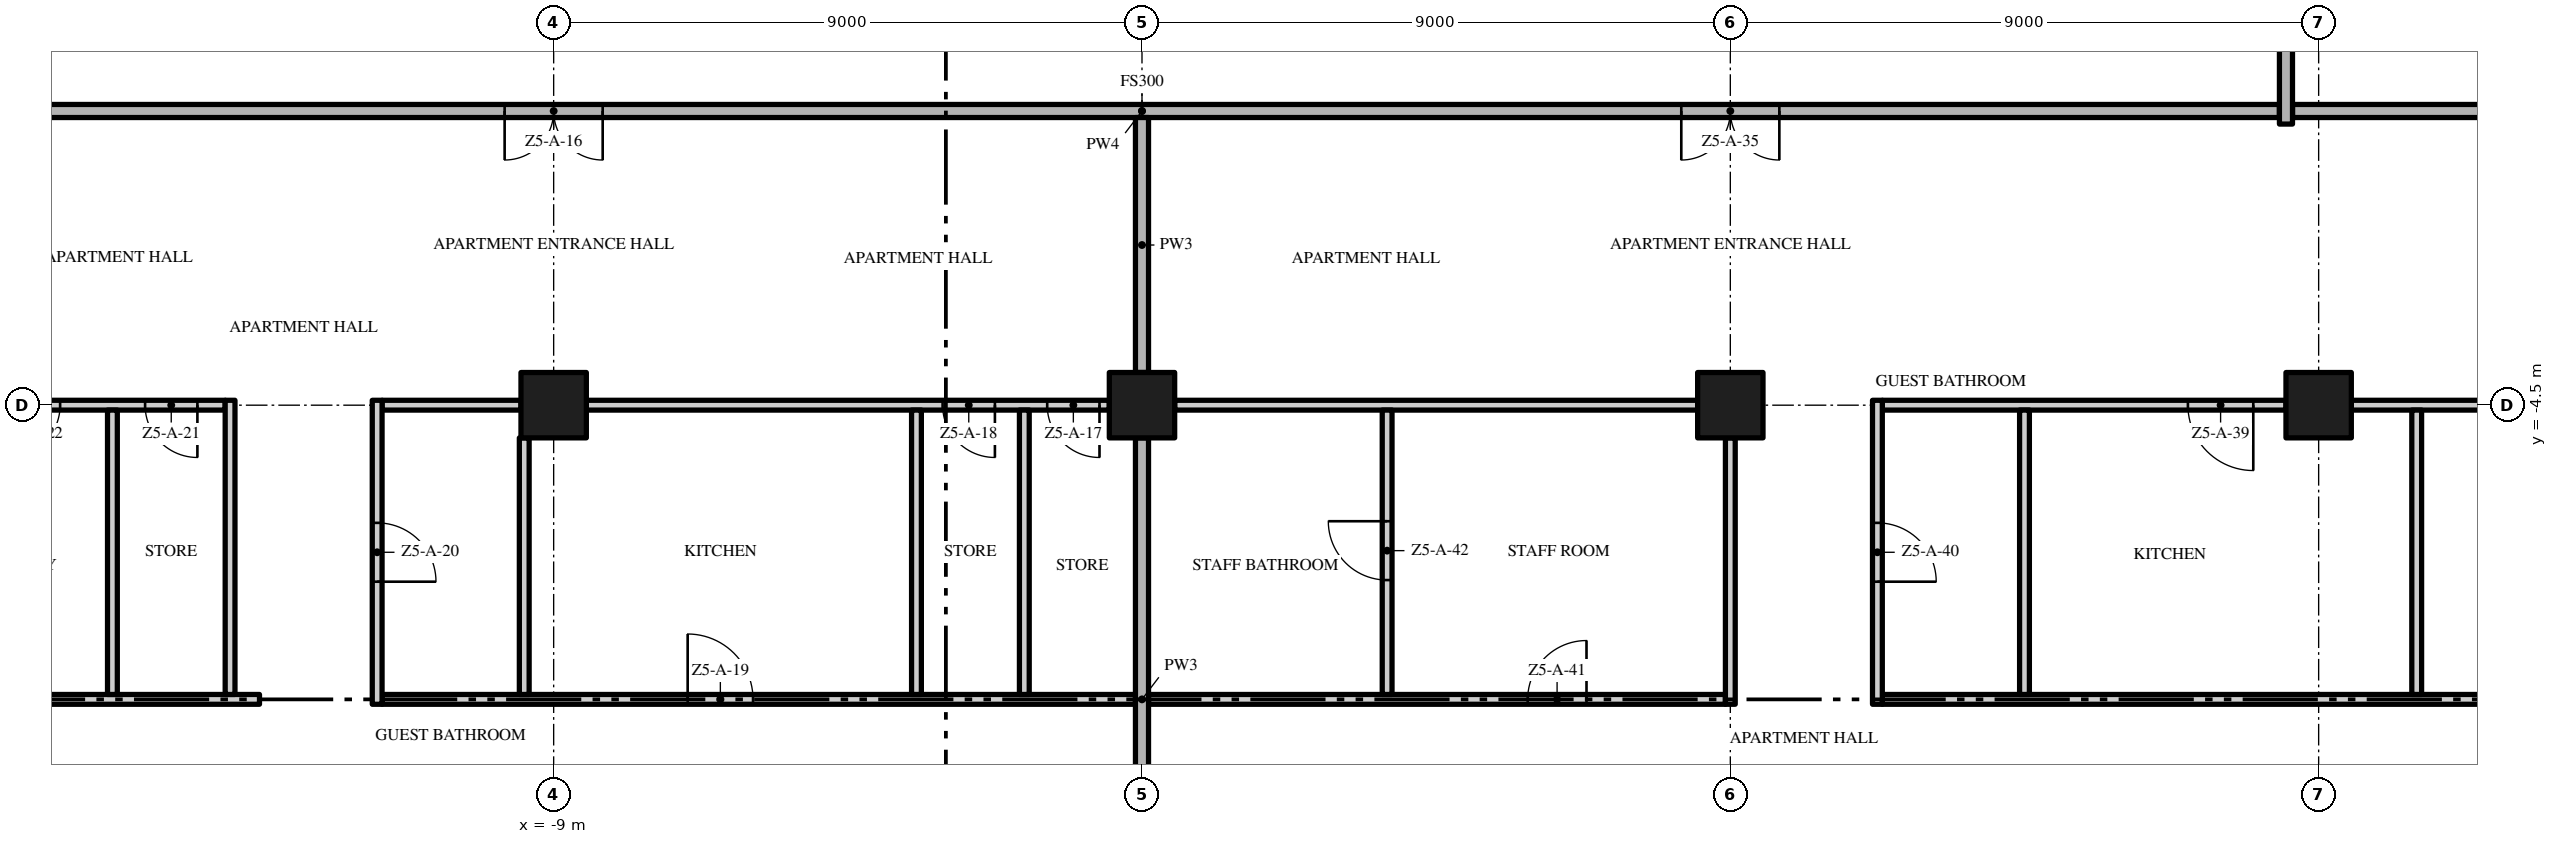
"""IFC4 building model, lengths in metres.
Left out: names, types, materials, properties, quantities, classifications, styles, units other than length and angle.
Written with IfcOpenShell. Run it as: python <this file> out.ifc"""

import sys

from ifc_helpers import new_model, si_unit, direction, frame, frame_2d, origin, origin_2d, place, context, subcontext, project, spatial, rectangle, extrude, element, fill, save


model = new_model("IFC4")
c1 = context("Model", 3, precision=1e-05, world=origin(), true_north=direction((0.0, 1.0)))
c2 = subcontext(c1, "Body", "Model", "MODEL_VIEW")
j1 = project(units=[si_unit("LENGTHUNIT", "METRE"), si_unit("PLANEANGLEUNIT", "RADIAN")], contexts=[c1])
p1 = place(None, origin())
s1 = spatial("IfcSite", under=j1, at=p1, CompositionType="ELEMENT")
p2 = place(p1, origin())
s2 = spatial("IfcBuilding", under=s1, at=p2, CompositionType="ELEMENT")
p3 = place(p2, frame((0.0, 0.0, 242.6)))
s3 = spatial("IfcBuildingStorey", under=s2, at=p3, CompositionType="ELEMENT", Elevation=242.6)
for number, where, z_axis, x_axis in (
    (1, (-9.0, -4.5, 0.0), (0.0, 0.0, 1.0), (1.0, 0.0, 0.0)),
    (2, (0.0, -4.5, 0.0), (0.0, 0.0, 1.0), (1.0, 0.0, 0.0)),
    (3, (18.0, -4.5, 0.0), (0.0, 0.0, 1.0), (1.0, 0.0, 0.0)),
    (4, (9.0, -4.5, 0.0), (0.0, 0.0, 1.0), (1.0, 0.0, 0.0)),
):
    element("IfcColumn", number, at=place(p3, frame(where, z_axis=z_axis, x_axis=x_axis)), inside=s3, PredefinedType="COLUMN", context=c2, shape_type="SweptSolid", body=[
        extrude(rectangle(XDim=1.0, YDim=1.0, at=origin_2d()), origin(), (0.0, 0.0, 1.0), 3.5),
    ])
p4 = place(p3, frame((-26.7, -9.0, 0.0), z_axis=(0.0, 0.0, 1.0), x_axis=(1.0, 0.0, 0.0)))
e5 = element("IfcWall", 5, at=p4, inside=s3, PredefinedType="PARTITIONING", context=c2, shape_type="SweptSolid", body=[
    extrude(rectangle(XDim=13.2, YDim=0.15, at=frame_2d((6.6, 0.0))), origin(), (0.0, 0.0, 1.0), 3.5),
])
p5 = place(p3, frame((-11.625, -9.0, 0.0), z_axis=(0.0, 0.0, 1.0), x_axis=(1.0, 0.0, 0.0)))
e6 = element("IfcWall", 6, at=p5, inside=s3, PredefinedType="PARTITIONING", context=c2, shape_type="SweptSolid", body=[
    extrude(rectangle(XDim=11.525, YDim=0.15, at=frame_2d((5.763, 0.0))), origin(), (0.0, 0.0, 1.0), 3.5),
])
p6 = place(p5, frame((4.675, 0.0, 0.0)))
e7 = element("IfcOpeningElement", 7, at=p6, cuts=e6, PredefinedType="OPENING", context=c2, shape_type="SweptSolid", body=[
    extrude(rectangle(XDim=1.0, YDim=2.4, at=frame_2d((0.5, 1.2))), frame((0.0, 0.085, 0.0), z_axis=(0.0, -1.0, 0.0), x_axis=(1.0, 0.0, 0.0)), (0.0, 0.0, 1.0), 0.17),
])
p7 = place(p3, frame((0.1, -9.0, 0.0), z_axis=(0.0, 0.0, 1.0), x_axis=(1.0, 0.0, 0.0)))
e8 = element("IfcWall", 8, at=p7, inside=s3, PredefinedType="PARTITIONING", context=c2, shape_type="SweptSolid", body=[
    extrude(rectangle(XDim=8.825, YDim=0.15, at=frame_2d((4.412, 0.0))), origin(), (0.0, 0.0, 1.0), 3.5),
])
p8 = place(p7, frame((5.8, 0.0, 0.0)))
e9 = element("IfcOpeningElement", 9, at=p8, cuts=e8, PredefinedType="OPENING", context=c2, shape_type="SweptSolid", body=[
    extrude(rectangle(XDim=0.9, YDim=2.1, at=frame_2d((0.45, 1.05))), frame((0.0, 0.085, 0.0), z_axis=(0.0, -1.0, 0.0), x_axis=(1.0, 0.0, 0.0)), (0.0, 0.0, 1.0), 0.17),
])
p9 = place(p3, frame((11.325, -9.0, 0.0), z_axis=(0.0, 0.0, 1.0), x_axis=(1.0, 0.0, 0.0)))
e10 = element("IfcWall", 10, at=p9, inside=s3, PredefinedType="PARTITIONING", context=c2, shape_type="SweptSolid", body=[
    extrude(rectangle(XDim=15.375, YDim=0.15, at=frame_2d((7.688, 0.0))), origin(), (0.0, 0.0, 1.0), 3.5),
])
p10 = place(p9, frame((14.375, 0.0, 0.0)))
e11 = element("IfcOpeningElement", 11, at=p10, cuts=e10, PredefinedType="OPENING", context=c2, shape_type="SweptSolid", body=[
    extrude(rectangle(XDim=0.8, YDim=2.0, at=frame_2d((0.4, 1.0))), frame((0.0, 0.085, 0.0), z_axis=(0.0, -1.0, 0.0), x_axis=(1.0, 0.0, 0.0)), (0.0, 0.0, 1.0), 0.17),
])
p11 = place(p3, frame((-14.025, -4.5, 0.0), z_axis=(0.0, 0.0, 1.0), x_axis=(-1.0, 0.0, 0.0)))
e12 = element("IfcWall", 12, at=p11, inside=s3, PredefinedType="PARTITIONING", context=c2, shape_type="SweptSolid", body=[
    extrude(rectangle(XDim=3.475, YDim=0.15, at=frame_2d((1.738, 0.0))), origin(), (0.0, 0.0, 1.0), 3.5),
])
p12 = place(p11, frame((0.425, 0.0, 0.0)))
e13 = element("IfcOpeningElement", 13, at=p12, cuts=e12, PredefinedType="OPENING", context=c2, shape_type="SweptSolid", body=[
    extrude(rectangle(XDim=0.8, YDim=2.0, at=frame_2d((0.4, 1.0))), frame((0.0, 0.085, 0.0), z_axis=(0.0, -1.0, 0.0), x_axis=(1.0, 0.0, 0.0)), (0.0, 0.0, 1.0), 0.17),
])
p13 = place(p11, frame((2.525, 0.0, 0.0)))
e14 = element("IfcOpeningElement", 14, at=p13, cuts=e12, PredefinedType="OPENING", context=c2, shape_type="SweptSolid", body=[
    extrude(rectangle(XDim=0.8, YDim=2.0, at=frame_2d((0.4, 1.0))), frame((0.0, 0.085, 0.0), z_axis=(0.0, -1.0, 0.0), x_axis=(1.0, 0.0, 0.0)), (0.0, 0.0, 1.0), 0.17),
])
p14 = place(p3, frame((-11.625, -4.5, 0.0), z_axis=(0.0, 0.0, 1.0), x_axis=(1.0, 0.0, 0.0)))
e15 = element("IfcWall", 15, at=p14, inside=s3, PredefinedType="PARTITIONING", context=c2, shape_type="SweptSolid", body=[
    extrude(rectangle(XDim=2.125, YDim=0.15, at=frame_2d((1.062, 0.0))), origin(), (0.0, 0.0, 1.0), 3.5),
])
p15 = place(p3, frame((-0.5, -4.5, 0.0), z_axis=(0.0, 0.0, 1.0), x_axis=(-1.0, 0.0, 0.0)))
e16 = element("IfcWall", 16, at=p15, inside=s3, PredefinedType="PARTITIONING", context=c2, shape_type="SweptSolid", body=[
    extrude(rectangle(XDim=8.0, YDim=0.15, at=frame_2d((4.0, 0.0))), origin(), (0.0, 0.0, 1.0), 3.5),
])
p16 = place(p15, frame((0.15, 0.0, 0.0)))
e17 = element("IfcOpeningElement", 17, at=p16, cuts=e16, PredefinedType="OPENING", context=c2, shape_type="SweptSolid", body=[
    extrude(rectangle(XDim=0.8, YDim=2.0, at=frame_2d((0.4, 1.0))), frame((0.0, 0.085, 0.0), z_axis=(0.0, -1.0, 0.0), x_axis=(1.0, 0.0, 0.0)), (0.0, 0.0, 1.0), 0.17),
])
p17 = place(p15, frame((1.75, 0.0, 0.0)))
e18 = element("IfcOpeningElement", 18, at=p17, cuts=e16, PredefinedType="OPENING", context=c2, shape_type="SweptSolid", body=[
    extrude(rectangle(XDim=0.8, YDim=2.0, at=frame_2d((0.4, 1.0))), frame((0.0, 0.085, 0.0), z_axis=(0.0, -1.0, 0.0), x_axis=(1.0, 0.0, 0.0)), (0.0, 0.0, 1.0), 0.17),
])
p18 = place(p3, frame((0.5, -4.5, 0.0), z_axis=(0.0, 0.0, 1.0), x_axis=(1.0, 0.0, 0.0)))
e19 = element("IfcWall", 19, at=p18, inside=s3, PredefinedType="PARTITIONING", context=c2, shape_type="SweptSolid", body=[
    extrude(rectangle(XDim=8.0, YDim=0.15, at=frame_2d((4.0, 0.0))), origin(), (0.0, 0.0, 1.0), 3.5),
])
p19 = place(p3, frame((17.5, -4.5, 0.0), z_axis=(0.0, 0.0, 1.0), x_axis=(-1.0, 0.0, 0.0)))
e20 = element("IfcWall", 20, at=p19, inside=s3, PredefinedType="PARTITIONING", context=c2, shape_type="SweptSolid", body=[
    extrude(rectangle(XDim=6.175, YDim=0.15, at=frame_2d((3.087, 0.0))), origin(), (0.0, 0.0, 1.0), 3.5),
])
p20 = place(p19, frame((0.5, 0.0, 0.0)))
e21 = element("IfcOpeningElement", 21, at=p20, cuts=e20, PredefinedType="OPENING", context=c2, shape_type="SweptSolid", body=[
    extrude(rectangle(XDim=1.0, YDim=2.4, at=frame_2d((0.5, 1.2))), frame((0.0, 0.085, 0.0), z_axis=(0.0, -1.0, 0.0), x_axis=(1.0, 0.0, 0.0)), (0.0, 0.0, 1.0), 0.17),
])
p21 = place(p3, frame((26.1, -4.5, 0.0), z_axis=(0.0, 0.0, 1.0), x_axis=(-1.0, 0.0, 0.0)))
e22 = element("IfcWall", 22, at=p21, inside=s3, PredefinedType="PARTITIONING", context=c2, shape_type="SweptSolid", body=[
    extrude(rectangle(XDim=7.6, YDim=0.15, at=frame_2d((3.8, 0.0))), origin(), (0.0, 0.0, 1.0), 3.5),
])
p22 = place(p21, frame((1.85, 0.0, 0.0)))
e23 = element("IfcOpeningElement", 23, at=p22, cuts=e22, PredefinedType="OPENING", context=c2, shape_type="SweptSolid", body=[
    extrude(rectangle(XDim=0.8, YDim=2.0, at=frame_2d((0.4, 1.0))), frame((0.0, 0.085, 0.0), z_axis=(0.0, -1.0, 0.0), x_axis=(1.0, 0.0, 0.0)), (0.0, 0.0, 1.0), 0.17),
])
p23 = place(p21, frame((4.7, 0.0, 0.0)))
e24 = element("IfcOpeningElement", 24, at=p23, cuts=e22, PredefinedType="OPENING", context=c2, shape_type="SweptSolid", body=[
    extrude(rectangle(XDim=0.8, YDim=2.0, at=frame_2d((0.4, 1.0))), frame((0.0, 0.085, 0.0), z_axis=(0.0, -1.0, 0.0), x_axis=(1.0, 0.0, 0.0)), (0.0, 0.0, 1.0), 0.17),
])
p24 = place(p3, frame((17.4, 0.0, 0.0), z_axis=(0.0, 0.0, 1.0), x_axis=(-1.0, 0.0, 0.0)))
e25 = element("IfcWall", 25, at=p24, inside=s3, PredefinedType="PARTITIONING", context=c2, shape_type="SweptSolid", body=[
    extrude(rectangle(XDim=34.8, YDim=0.2, at=frame_2d((17.4, 0.0))), origin(), (0.0, 0.0, 1.0), 3.5),
])
p25 = place(p24, frame((25.65, 0.0, 0.0)))
e26 = element("IfcOpeningElement", 26, at=p25, cuts=e25, PredefinedType="OPENING", context=c2, shape_type="SweptSolid", body=[
    extrude(rectangle(XDim=1.5, YDim=2.4, at=frame_2d((0.75, 1.2))), frame((0.0, 0.11, 0.0), z_axis=(0.0, -1.0, 0.0), x_axis=(1.0, 0.0, 0.0)), (0.0, 0.0, 1.0), 0.22),
])
p26 = place(p24, frame((7.65, 0.0, 0.0)))
e27 = element("IfcOpeningElement", 27, at=p26, cuts=e25, PredefinedType="OPENING", context=c2, shape_type="SweptSolid", body=[
    extrude(rectangle(XDim=1.5, YDim=2.4, at=frame_2d((0.75, 1.2))), frame((0.0, 0.11, 0.0), z_axis=(0.0, -1.0, 0.0), x_axis=(1.0, 0.0, 0.0)), (0.0, 0.0, 1.0), 0.22),
])
p27 = place(p3, frame((17.6, 0.0, 0.0), z_axis=(0.0, 0.0, 1.0), x_axis=(1.0, 0.0, 0.0)))
e28 = element("IfcWall", 28, at=p27, inside=s3, PredefinedType="PARTITIONING", context=c2, shape_type="SweptSolid", body=[
    extrude(rectangle(XDim=9.1, YDim=0.2, at=frame_2d((4.55, 0.0))), origin(), (0.0, 0.0, 1.0), 3.5),
])
p28 = place(p3, frame((-15.75, -8.925, 0.0), z_axis=(0.0, 0.0, 1.0), x_axis=(0.0, 1.0, 0.0)))
e29 = element("IfcWall", 29, at=p28, inside=s3, PredefinedType="PARTITIONING", context=c2, shape_type="SweptSolid", body=[
    extrude(rectangle(XDim=4.35, YDim=0.15, at=frame_2d((2.175, 0.0))), origin(), (0.0, 0.0, 1.0), 3.5),
])
p29 = place(p3, frame((-13.95, -8.925, 0.0), z_axis=(0.0, 0.0, 1.0), x_axis=(0.0, 1.0, 0.0)))
e30 = element("IfcWall", 30, at=p29, inside=s3, PredefinedType="PARTITIONING", context=c2, shape_type="SweptSolid", body=[
    extrude(rectangle(XDim=4.5, YDim=0.15, at=frame_2d((2.25, 0.0))), origin(), (0.0, 0.0, 1.0), 3.5),
])
p30 = place(p3, frame((-11.7, -4.425, 0.0), z_axis=(0.0, 0.0, 1.0), x_axis=(0.0, -1.0, 0.0)))
e31 = element("IfcWall", 31, at=p30, inside=s3, PredefinedType="PARTITIONING", context=c2, shape_type="SweptSolid", body=[
    extrude(rectangle(XDim=4.65, YDim=0.15, at=frame_2d((2.325, 0.0))), origin(), (0.0, 0.0, 1.0), 3.5),
])
p31 = place(p30, frame((1.875, 0.0, 0.0)))
e32 = element("IfcOpeningElement", 32, at=p31, cuts=e31, PredefinedType="OPENING", context=c2, shape_type="SweptSolid", body=[
    extrude(rectangle(XDim=0.9, YDim=2.1, at=frame_2d((0.45, 1.05))), frame((0.0, 0.085, 0.0), z_axis=(0.0, -1.0, 0.0), x_axis=(1.0, 0.0, 0.0)), (0.0, 0.0, 1.0), 0.17),
])
p32 = place(p3, frame((-9.45, -8.925, 0.0), z_axis=(0.0, 0.0, 1.0), x_axis=(0.0, 1.0, 0.0)))
e33 = element("IfcWall", 33, at=p32, inside=s3, PredefinedType="PARTITIONING", context=c2, shape_type="SweptSolid", body=[
    extrude(rectangle(XDim=3.925, YDim=0.15, at=frame_2d((1.962, 0.0))), origin(), (0.0, 0.0, 1.0), 3.5),
])
for number, where, z_axis, x_axis in (
    (34, (-3.45, -8.925, 0.0), (0.0, 0.0, 1.0), (0.0, 1.0, 0.0)),
    (35, (-1.8, -8.925, 0.0), (0.0, 0.0, 1.0), (0.0, 1.0, 0.0)),
):
    element("IfcWall", number, at=place(p3, frame(where, z_axis=z_axis, x_axis=x_axis)), inside=s3, PredefinedType="PARTITIONING", context=c2, shape_type="SweptSolid", body=[
        extrude(rectangle(XDim=4.35, YDim=0.15, at=frame_2d((2.175, 0.0))), origin(), (0.0, 0.0, 1.0), 3.5),
    ])
p33 = place(p3, frame((0.0, -13.0, 0.0), z_axis=(0.0, 0.0, 1.0), x_axis=(0.0, 1.0, 0.0)))
e36 = element("IfcWall", 36, at=p33, inside=s3, PredefinedType="PARTITIONING", context=c2, shape_type="SweptSolid", body=[
    extrude(rectangle(XDim=8.0, YDim=0.2, at=frame_2d((4.0, 0.0))), origin(), (0.0, 0.0, 1.0), 3.5),
])
p34 = place(p3, frame((0.0, -4.0, 0.0), z_axis=(0.0, 0.0, 1.0), x_axis=(0.0, 1.0, 0.0)))
e37 = element("IfcWall", 37, at=p34, inside=s3, PredefinedType="PARTITIONING", context=c2, shape_type="SweptSolid", body=[
    extrude(rectangle(XDim=3.9, YDim=0.2, at=frame_2d((1.95, 0.0))), origin(), (0.0, 0.0, 1.0), 3.5),
])
p35 = place(p3, frame((3.75, -8.925, 0.0), z_axis=(0.0, 0.0, 1.0), x_axis=(0.0, 1.0, 0.0)))
e38 = element("IfcWall", 38, at=p35, inside=s3, PredefinedType="PARTITIONING", context=c2, shape_type="SweptSolid", body=[
    extrude(rectangle(XDim=4.35, YDim=0.15, at=frame_2d((2.175, 0.0))), origin(), (0.0, 0.0, 1.0), 3.5),
])
p36 = place(p35, frame((1.75, 0.0, 0.0)))
e39 = element("IfcOpeningElement", 39, at=p36, cuts=e38, PredefinedType="OPENING", context=c2, shape_type="SweptSolid", body=[
    extrude(rectangle(XDim=0.9, YDim=2.1, at=frame_2d((0.45, 1.05))), frame((0.0, 0.085, 0.0), z_axis=(0.0, -1.0, 0.0), x_axis=(1.0, 0.0, 0.0)), (0.0, 0.0, 1.0), 0.17),
])
p37 = place(p3, frame((9.0, -9.075, 0.0), z_axis=(0.0, 0.0, 1.0), x_axis=(0.0, 1.0, 0.0)))
e40 = element("IfcWall", 40, at=p37, inside=s3, PredefinedType="PARTITIONING", context=c2, shape_type="SweptSolid", body=[
    extrude(rectangle(XDim=4.075, YDim=0.15, at=frame_2d((2.038, 0.0))), origin(), (0.0, 0.0, 1.0), 3.5),
])
p38 = place(p3, frame((11.25, -4.425, 0.0), z_axis=(0.0, 0.0, 1.0), x_axis=(0.0, -1.0, 0.0)))
e41 = element("IfcWall", 41, at=p38, inside=s3, PredefinedType="PARTITIONING", context=c2, shape_type="SweptSolid", body=[
    extrude(rectangle(XDim=4.65, YDim=0.15, at=frame_2d((2.325, 0.0))), origin(), (0.0, 0.0, 1.0), 3.5),
])
p39 = place(p38, frame((1.875, 0.0, 0.0)))
e42 = element("IfcOpeningElement", 42, at=p39, cuts=e41, PredefinedType="OPENING", context=c2, shape_type="SweptSolid", body=[
    extrude(rectangle(XDim=0.9, YDim=2.1, at=frame_2d((0.45, 1.05))), frame((0.0, 0.085, 0.0), z_axis=(0.0, -1.0, 0.0), x_axis=(1.0, 0.0, 0.0)), (0.0, 0.0, 1.0), 0.17),
])
p40 = place(p3, frame((13.5, -8.925, 0.0), z_axis=(0.0, 0.0, 1.0), x_axis=(0.0, 1.0, 0.0)))
e43 = element("IfcWall", 43, at=p40, inside=s3, PredefinedType="PARTITIONING", context=c2, shape_type="SweptSolid", body=[
    extrude(rectangle(XDim=4.35, YDim=0.15, at=frame_2d((2.175, 0.0))), origin(), (0.0, 0.0, 1.0), 3.5),
])
p41 = place(p3, frame((17.5, -0.2, 0.0), z_axis=(0.0, 0.0, 1.0), x_axis=(0.0, 1.0, 0.0)))
e44 = element("IfcWall", 44, at=p41, inside=s3, PredefinedType="PARTITIONING", context=c2, shape_type="SweptSolid", body=[
    extrude(rectangle(XDim=4.2, YDim=0.2, at=frame_2d((2.1, 0.0))), origin(), (0.0, 0.0, 1.0), 3.5),
])
p42 = place(p3, frame((19.5, -8.925, 0.0), z_axis=(0.0, 0.0, 1.0), x_axis=(0.0, 1.0, 0.0)))
e45 = element("IfcWall", 45, at=p42, inside=s3, PredefinedType="PARTITIONING", context=c2, shape_type="SweptSolid", body=[
    extrude(rectangle(XDim=4.35, YDim=0.15, at=frame_2d((2.175, 0.0))), origin(), (0.0, 0.0, 1.0), 3.5),
])
p43 = place(p25, origin())
e46 = element("IfcDoor", 46, at=p43, inside=s3, OperationType="DOUBLE_DOOR_SINGLE_SWING", PredefinedType="DOOR", context=c2, shape_type="SweptSolid", body=[
    extrude(rectangle(XDim=1.5, YDim=2.4, at=frame_2d((0.75, 1.2))), frame((0.0, 0.025, 0.0), z_axis=(0.0, -1.0, 0.0), x_axis=(1.0, 0.0, 0.0)), (0.0, 0.0, 1.0), 0.05),
])
fill(e26, e46)
p44 = place(p16, origin())
e47 = element("IfcDoor", 47, at=p44, inside=s3, OperationType="SINGLE_SWING_LEFT", PredefinedType="DOOR", context=c2, shape_type="SweptSolid", body=[
    extrude(rectangle(XDim=0.8, YDim=2.0, at=frame_2d((0.4, 1.0))), frame((0.0, 0.025, 0.0), z_axis=(0.0, -1.0, 0.0), x_axis=(1.0, 0.0, 0.0)), (0.0, 0.0, 1.0), 0.05),
])
fill(e17, e47)
p45 = place(p17, origin())
e48 = element("IfcDoor", 48, at=p45, inside=s3, OperationType="SINGLE_SWING_LEFT", PredefinedType="DOOR", context=c2, shape_type="SweptSolid", body=[
    extrude(rectangle(XDim=0.8, YDim=2.0, at=frame_2d((0.4, 1.0))), frame((0.0, 0.025, 0.0), z_axis=(0.0, -1.0, 0.0), x_axis=(1.0, 0.0, 0.0)), (0.0, 0.0, 1.0), 0.05),
])
fill(e18, e48)
p46 = place(p6, origin())
e49 = element("IfcDoor", 49, at=p46, inside=s3, OperationType="SINGLE_SWING_LEFT", PredefinedType="DOOR", context=c2, shape_type="SweptSolid", body=[
    extrude(rectangle(XDim=1.0, YDim=2.4, at=frame_2d((0.5, 1.2))), frame((0.0, 0.025, 0.0), z_axis=(0.0, -1.0, 0.0), x_axis=(1.0, 0.0, 0.0)), (0.0, 0.0, 1.0), 0.05),
])
fill(e7, e49)
p47 = place(p31, origin())
e50 = element("IfcDoor", 50, at=p47, inside=s3, OperationType="SINGLE_SWING_RIGHT", PredefinedType="DOOR", context=c2, shape_type="SweptSolid", body=[
    extrude(rectangle(XDim=0.9, YDim=2.1, at=frame_2d((0.45, 1.05))), frame((0.0, 0.025, 0.0), z_axis=(0.0, -1.0, 0.0), x_axis=(1.0, 0.0, 0.0)), (0.0, 0.0, 1.0), 0.05),
])
fill(e32, e50)
p48 = place(p12, origin())
e51 = element("IfcDoor", 51, at=p48, inside=s3, OperationType="SINGLE_SWING_LEFT", PredefinedType="DOOR", context=c2, shape_type="SweptSolid", body=[
    extrude(rectangle(XDim=0.8, YDim=2.0, at=frame_2d((0.4, 1.0))), frame((0.0, 0.025, 0.0), z_axis=(0.0, -1.0, 0.0), x_axis=(1.0, 0.0, 0.0)), (0.0, 0.0, 1.0), 0.05),
])
fill(e13, e51)
p49 = place(p13, origin())
e52 = element("IfcDoor", 52, at=p49, inside=s3, OperationType="SINGLE_SWING_RIGHT", PredefinedType="DOOR", context=c2, shape_type="SweptSolid", body=[
    extrude(rectangle(XDim=0.8, YDim=2.0, at=frame_2d((0.4, 1.0))), frame((0.0, 0.025, 0.0), z_axis=(0.0, -1.0, 0.0), x_axis=(1.0, 0.0, 0.0)), (0.0, 0.0, 1.0), 0.05),
])
fill(e14, e52)
p50 = place(p26, origin())
e53 = element("IfcDoor", 53, at=p50, inside=s3, OperationType="DOUBLE_DOOR_SINGLE_SWING", PredefinedType="DOOR", context=c2, shape_type="SweptSolid", body=[
    extrude(rectangle(XDim=1.5, YDim=2.4, at=frame_2d((0.75, 1.2))), frame((0.0, 0.025, 0.0), z_axis=(0.0, -1.0, 0.0), x_axis=(1.0, 0.0, 0.0)), (0.0, 0.0, 1.0), 0.05),
])
fill(e27, e53)
p51 = place(p20, origin())
e54 = element("IfcDoor", 54, at=p51, inside=s3, OperationType="SINGLE_SWING_LEFT", PredefinedType="DOOR", context=c2, shape_type="SweptSolid", body=[
    extrude(rectangle(XDim=1.0, YDim=2.4, at=frame_2d((0.5, 1.2))), frame((0.0, 0.025, 0.0), z_axis=(0.0, -1.0, 0.0), x_axis=(1.0, 0.0, 0.0)), (0.0, 0.0, 1.0), 0.05),
])
fill(e21, e54)
p52 = place(p39, origin())
e55 = element("IfcDoor", 55, at=p52, inside=s3, OperationType="SINGLE_SWING_RIGHT", PredefinedType="DOOR", context=c2, shape_type="SweptSolid", body=[
    extrude(rectangle(XDim=0.9, YDim=2.1, at=frame_2d((0.45, 1.05))), frame((0.0, 0.025, 0.0), z_axis=(0.0, -1.0, 0.0), x_axis=(1.0, 0.0, 0.0)), (0.0, 0.0, 1.0), 0.05),
])
fill(e42, e55)
p53 = place(p8, origin())
e56 = element("IfcDoor", 56, at=p53, inside=s3, OperationType="SINGLE_SWING_RIGHT", PredefinedType="DOOR", context=c2, shape_type="SweptSolid", body=[
    extrude(rectangle(XDim=0.9, YDim=2.1, at=frame_2d((0.45, 1.05))), frame((0.0, 0.025, 0.0), z_axis=(0.0, -1.0, 0.0), x_axis=(1.0, 0.0, 0.0)), (0.0, 0.0, 1.0), 0.05),
])
fill(e9, e56)
p54 = place(p36, origin())
e57 = element("IfcDoor", 57, at=p54, inside=s3, OperationType="SINGLE_SWING_RIGHT", PredefinedType="DOOR", context=c2, shape_type="SweptSolid", body=[
    extrude(rectangle(XDim=0.9, YDim=2.1, at=frame_2d((0.45, 1.05))), frame((0.0, 0.025, 0.0), z_axis=(0.0, -1.0, 0.0), x_axis=(1.0, 0.0, 0.0)), (0.0, 0.0, 1.0), 0.05),
])
fill(e39, e57)
save(model, sys.argv[1])
